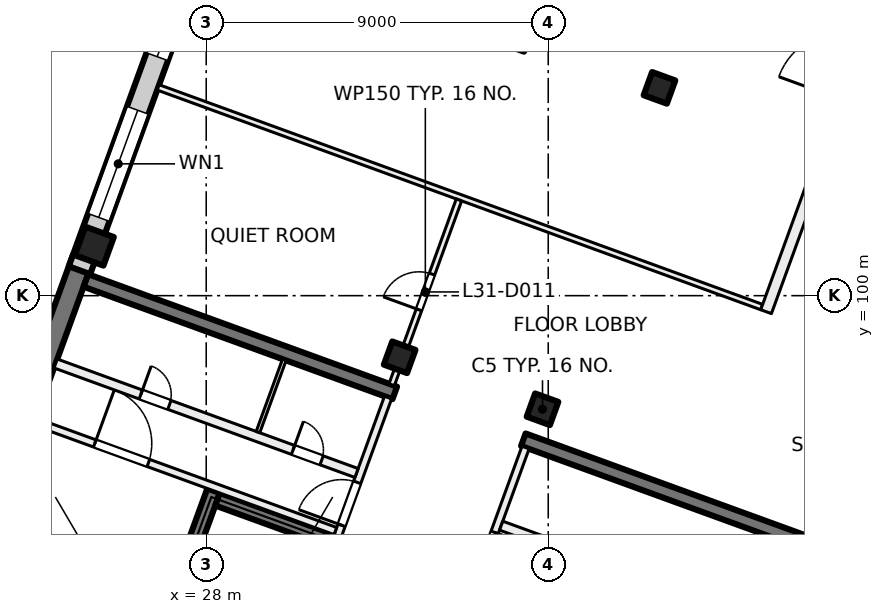
"""IFC4 building model, lengths in metres.
Left out: names, types, materials, properties, quantities, classifications, styles, units other than length and angle.
Written with IfcOpenShell. Run it as: python <this file> out.ifc"""

import sys

from ifc_helpers import new_model, si_unit, direction, frame, frame_2d, origin, origin_2d, place, context, subcontext, project, spatial, rectangle, extrude, element, fill, save


model = new_model("IFC4")
c1 = context("Model", 3, precision=1e-05, world=origin(), true_north=direction((0.0, 1.0)))
c2 = subcontext(c1, "Body", "Model", "MODEL_VIEW")
j1 = project(units=[si_unit("LENGTHUNIT", "METRE"), si_unit("PLANEANGLEUNIT", "RADIAN")], contexts=[c1])
p1 = place(None, origin())
s1 = spatial("IfcSite", under=j1, at=p1, CompositionType="ELEMENT")
p2 = place(p1, origin())
s2 = spatial("IfcBuilding", under=s1, at=p2, CompositionType="ELEMENT")
p3 = place(p2, frame((0.0, 0.0, 134.5)))
s3 = spatial("IfcBuildingStorey", under=s2, at=p3, CompositionType="ELEMENT", Elevation=134.5)
for number, where, z_axis, x_axis in (
    (1, (39.927, 105.468, 0.0), (0.0, 0.0, 1.0), (-0.342, -0.94, 0.0)),
    (2, (36.849, 97.011, 0.0), (0.0, 0.0, 1.0), (-0.342, -0.94, 0.0)),
    (3, (33.091, 98.379, 0.0), (0.0, 0.0, 1.0), (-0.342, -0.94, 0.0)),
):
    element("IfcColumn", number, at=place(p3, frame(where, z_axis=z_axis, x_axis=x_axis)), inside=s3, PredefinedType="COLUMN", context=c2, shape_type="SweptSolid", body=[
        extrude(rectangle(XDim=0.65, YDim=0.65, at=origin_2d()), origin(), (0.0, 0.0, 1.0), 4.0),
    ])
p4 = place(p3, frame((25.056, 101.303, 0.0), z_axis=(0.0, 0.0, 1.0), x_axis=(-0.342020143326, -0.939692620786, 0.0)))
e4 = element("IfcColumn", 4, at=p4, inside=s3, PredefinedType="COLUMN", context=c2, shape_type="SweptSolid", body=[
    extrude(rectangle(XDim=0.8, YDim=0.8, at=origin_2d()), origin(), (0.0, 0.0, 1.0), 4.0),
])
p5 = place(p3, frame((41.85, 85.241, 0.0), z_axis=(0.0, 0.0, 1.0), x_axis=(0.34201902012, 0.939693029598, 0.0)))
e5 = element("IfcWall", 5, at=p5, inside=s3, PredefinedType="SHEAR", context=c2, shape_type="SweptSolid", body=[
    extrude(rectangle(XDim=8.95, YDim=0.55, at=frame_2d((4.475, 0.0))), origin(), (0.0, 0.0, 1.0), 4.0),
])
p6 = place(p3, frame((21.694, 92.577, 0.0), z_axis=(0.0, 0.0, 1.0), x_axis=(0.342010253184, 0.939696220444, 0.0)))
e6 = element("IfcWall", 6, at=p6, inside=s3, PredefinedType="SHEAR", context=c2, shape_type="SweptSolid", body=[
    extrude(rectangle(XDim=8.95, YDim=0.55, at=frame_2d((4.475, 0.0))), origin(), (0.0, 0.0, 1.0), 4.0),
])
p7 = place(p3, frame((27.208, 82.216, 0.0), z_axis=(0.0, 0.0, 1.0), x_axis=(0.34201563943, 0.939694260058, 0.0)))
e7 = element("IfcWall", 7, at=p7, inside=s3, PredefinedType="SHEAR", context=c2, shape_type="SweptSolid", body=[
    extrude(rectangle(XDim=12.225, YDim=0.35, at=frame_2d((6.113, 0.0))), origin(), (0.0, 0.0, 1.0), 4.0),
])
p8 = place(p7, frame((0.7, 0.0, 0.0)))
e8 = element("IfcOpeningElement", 8, at=p8, cuts=e7, PredefinedType="OPENING", context=c2, shape_type="SweptSolid", body=[
    extrude(rectangle(XDim=1.1, YDim=2.1, at=frame_2d((0.55, 1.05))), frame((0.0, 0.185, 0.0), z_axis=(0.0, -1.0, 0.0), x_axis=(1.0, 0.0, 0.0)), (0.0, 0.0, 1.0), 0.37),
])
p9 = place(p7, frame((3.1, 0.0, 0.0)))
e9 = element("IfcOpeningElement", 9, at=p9, cuts=e7, PredefinedType="OPENING", context=c2, shape_type="SweptSolid", body=[
    extrude(rectangle(XDim=1.1, YDim=2.1, at=frame_2d((0.55, 1.05))), frame((0.0, 0.185, 0.0), z_axis=(0.0, -1.0, 0.0), x_axis=(1.0, 0.0, 0.0)), (0.0, 0.0, 1.0), 0.37),
])
p10 = place(p7, frame((5.5, 0.0, 0.0)))
e10 = element("IfcOpeningElement", 10, at=p10, cuts=e7, PredefinedType="OPENING", context=c2, shape_type="SweptSolid", body=[
    extrude(rectangle(XDim=1.1, YDim=2.1, at=frame_2d((0.55, 1.05))), frame((0.0, 0.185, 0.0), z_axis=(0.0, -1.0, 0.0), x_axis=(1.0, 0.0, 0.0)), (0.0, 0.0, 1.0), 0.37),
])
p11 = place(p7, frame((10.3, 0.0, 0.0)))
e11 = element("IfcOpeningElement", 11, at=p11, cuts=e7, PredefinedType="OPENING", context=c2, shape_type="SweptSolid", body=[
    extrude(rectangle(XDim=1.1, YDim=2.1, at=frame_2d((0.55, 1.05))), frame((0.0, 0.185, 0.0), z_axis=(0.0, -1.0, 0.0), x_axis=(1.0, 0.0, 0.0)), (0.0, 0.0, 1.0), 0.37),
])
p12 = place(p3, frame((24.013, 83.379, 0.0), z_axis=(0.0, 0.0, 1.0), x_axis=(0.34201563943, 0.939694260058, 0.0)))
e12 = element("IfcWall", 12, at=p12, inside=s3, PredefinedType="SHEAR", context=c2, shape_type="SweptSolid", body=[
    extrude(rectangle(XDim=12.225, YDim=0.35, at=frame_2d((6.113, 0.0))), origin(), (0.0, 0.0, 1.0), 4.0),
])
p13 = place(p12, frame((7.95, 0.0, 0.0)))
e13 = element("IfcOpeningElement", 13, at=p13, cuts=e12, PredefinedType="OPENING", context=c2, shape_type="SweptSolid", body=[
    extrude(rectangle(XDim=1.1, YDim=2.1, at=frame_2d((0.55, 1.05))), frame((0.0, 0.185, 0.0), z_axis=(0.0, -1.0, 0.0), x_axis=(1.0, 0.0, 0.0)), (0.0, 0.0, 1.0), 0.37),
])
p14 = place(p3, frame((31.165, 93.599, 0.0), z_axis=(0.0, 0.0, 1.0), x_axis=(-0.939683528043, 0.3420451244, 0.0)))
e14 = element("IfcWall", 14, at=p14, inside=s3, PredefinedType="SHEAR", context=c2, shape_type="SweptSolid", body=[
    extrude(rectangle(XDim=3.05, YDim=0.35, at=frame_2d((1.525, 0.0))), origin(), (0.0, 0.0, 1.0), 4.0),
])
p15 = place(p3, frame((44.473, 93.251, 0.0), z_axis=(0.0, 0.0, 1.0), x_axis=(-0.939692847377, 0.34201952077, 0.0)))
e15 = element("IfcWall", 15, at=p15, inside=s3, PredefinedType="SHEAR", context=c2, shape_type="SweptSolid", body=[
    extrude(rectangle(XDim=8.65, YDim=0.35, at=frame_2d((4.325, 0.0))), origin(), (0.0, 0.0, 1.0), 4.0),
])
p16 = place(p3, frame((32.962, 97.441, 0.0), z_axis=(0.0, 0.0, 1.0), x_axis=(-0.939689545667, 0.342028592028, 0.0)))
e16 = element("IfcWall", 16, at=p16, inside=s3, PredefinedType="SHEAR", context=c2, shape_type="SweptSolid", body=[
    extrude(rectangle(XDim=8.65, YDim=0.35, at=frame_2d((4.325, 0.0))), origin(), (0.0, 0.0, 1.0), 4.0),
])
p17 = place(p3, frame((24.666, 100.669, 0.0), z_axis=(0.0, 0.0, 1.0), x_axis=(0.34201964167, 0.939692803373, 0.0)))
e17 = element("IfcWall", 17, at=p17, inside=s3, PredefinedType="SOLIDWALL", context=c2, shape_type="SweptSolid", body=[
    extrude(rectangle(XDim=32.884, YDim=0.6, at=frame_2d((16.442, 0.0))), origin(), (0.0, 0.0, 1.0), 3.625),
])
p18 = place(p17, frame((1.48, 0.0, 0.9)))
e18 = element("IfcOpeningElement", 18, at=p18, cuts=e17, PredefinedType="OPENING", context=c2, shape_type="SweptSolid", body=[
    extrude(rectangle(XDim=3.0, YDim=2.4, at=frame_2d((1.5, 1.2))), frame((0.0, 0.31, 0.0), z_axis=(0.0, -1.0, 0.0), x_axis=(1.0, 0.0, 0.0)), (0.0, 0.0, 1.0), 0.62),
])
p19 = place(p17, frame((5.98, 0.0, 0.9)))
e19 = element("IfcOpeningElement", 19, at=p19, cuts=e17, PredefinedType="OPENING", context=c2, shape_type="SweptSolid", body=[
    extrude(rectangle(XDim=3.0, YDim=2.4, at=frame_2d((1.5, 1.2))), frame((0.0, 0.31, 0.0), z_axis=(0.0, -1.0, 0.0), x_axis=(1.0, 0.0, 0.0)), (0.0, 0.0, 1.0), 0.62),
])
p20 = place(p17, frame((10.48, 0.0, 0.9)))
e20 = element("IfcOpeningElement", 20, at=p20, cuts=e17, PredefinedType="OPENING", context=c2, shape_type="SweptSolid", body=[
    extrude(rectangle(XDim=3.0, YDim=2.4, at=frame_2d((1.5, 1.2))), frame((0.0, 0.31, 0.0), z_axis=(0.0, -1.0, 0.0), x_axis=(1.0, 0.0, 0.0)), (0.0, 0.0, 1.0), 0.62),
])
p21 = place(p17, frame((14.98, 0.0, 0.9)))
e21 = element("IfcOpeningElement", 21, at=p21, cuts=e17, PredefinedType="OPENING", context=c2, shape_type="SweptSolid", body=[
    extrude(rectangle(XDim=3.0, YDim=2.4, at=frame_2d((1.5, 1.2))), frame((0.0, 0.31, 0.0), z_axis=(0.0, -1.0, 0.0), x_axis=(1.0, 0.0, 0.0)), (0.0, 0.0, 1.0), 0.62),
])
p22 = place(p17, frame((19.48, 0.0, 0.9)))
e22 = element("IfcOpeningElement", 22, at=p22, cuts=e17, PredefinedType="OPENING", context=c2, shape_type="SweptSolid", body=[
    extrude(rectangle(XDim=3.0, YDim=2.4, at=frame_2d((1.5, 1.2))), frame((0.0, 0.31, 0.0), z_axis=(0.0, -1.0, 0.0), x_axis=(1.0, 0.0, 0.0)), (0.0, 0.0, 1.0), 0.62),
])
p23 = place(p17, frame((23.98, 0.0, 0.9)))
e23 = element("IfcOpeningElement", 23, at=p23, cuts=e17, PredefinedType="OPENING", context=c2, shape_type="SweptSolid", body=[
    extrude(rectangle(XDim=3.0, YDim=2.4, at=frame_2d((1.5, 1.2))), frame((0.0, 0.31, 0.0), z_axis=(0.0, -1.0, 0.0), x_axis=(1.0, 0.0, 0.0)), (0.0, 0.0, 1.0), 0.62),
])
p24 = place(p17, frame((28.48, 0.0, 0.9)))
e24 = element("IfcOpeningElement", 24, at=p24, cuts=e17, PredefinedType="OPENING", context=c2, shape_type="SweptSolid", body=[
    extrude(rectangle(XDim=3.0, YDim=2.4, at=frame_2d((1.5, 1.2))), frame((0.0, 0.31, 0.0), z_axis=(0.0, -1.0, 0.0), x_axis=(1.0, 0.0, 0.0)), (0.0, 0.0, 1.0), 0.62),
])
p25 = place(p3, frame((31.459, 93.678, 0.0), z_axis=(0.0, 0.0, 1.0), x_axis=(0.341985870128, 0.939705094502, 0.0)))
e25 = element("IfcWall", 25, at=p25, inside=s3, PredefinedType="PARTITIONING", context=c2, shape_type="SweptSolid", body=[
    extrude(rectangle(XDim=3.875, YDim=0.2, at=frame_2d((1.938, 0.0))), origin(), (0.0, 0.0, 1.0), 3.625),
])
p26 = place(p25, frame((0.3, 0.0, 0.0)))
e26 = element("IfcOpeningElement", 26, at=p26, cuts=e25, PredefinedType="OPENING", context=c2, shape_type="SweptSolid", body=[
    extrude(rectangle(XDim=1.2, YDim=2.1, at=frame_2d((0.6, 1.05))), frame((0.0, 0.11, 0.0), z_axis=(0.0, -1.0, 0.0), x_axis=(1.0, 0.0, 0.0)), (0.0, 0.0, 1.0), 0.22),
])
p27 = place(p3, frame((23.483, 96.688, 0.0), z_axis=(0.0, 0.0, 1.0), x_axis=(0.939691007314, -0.342024576271, 0.0)))
e27 = element("IfcWall", 27, at=p27, inside=s3, PredefinedType="PARTITIONING", context=c2, shape_type="SweptSolid", body=[
    extrude(rectangle(XDim=8.425, YDim=0.2, at=frame_2d((4.212, 0.0))), origin(), (0.0, 0.0, 1.0), 3.625),
])
p28 = place(p27, frame((1.688, 0.0, 0.0)))
e28 = element("IfcOpeningElement", 28, at=p28, cuts=e27, PredefinedType="OPENING", context=c2, shape_type="SweptSolid", body=[
    extrude(rectangle(XDim=1.5, YDim=2.1, at=frame_2d((0.75, 1.05))), frame((0.0, 0.11, 0.0), z_axis=(0.0, -1.0, 0.0), x_axis=(1.0, 0.0, 0.0)), (0.0, 0.0, 1.0), 0.22),
])
p29 = place(p3, frame((24.039, 98.215, 0.0), z_axis=(0.0, 0.0, 1.0), x_axis=(0.939687617333, -0.342033889887, 0.0)))
e29 = element("IfcWall", 29, at=p29, inside=s3, PredefinedType="PARTITIONING", context=c2, shape_type="SweptSolid", body=[
    extrude(rectangle(XDim=8.425, YDim=0.25, at=frame_2d((4.212, 0.0))), origin(), (0.0, 0.0, 1.0), 3.625),
])
p30 = place(p29, frame((6.647, 0.0, 0.0)))
e30 = element("IfcOpeningElement", 30, at=p30, cuts=e29, PredefinedType="OPENING", context=c2, shape_type="SweptSolid", body=[
    extrude(rectangle(XDim=0.8, YDim=2.1, at=frame_2d((0.4, 1.05))), frame((0.0, 0.135, 0.0), z_axis=(0.0, -1.0, 0.0), x_axis=(1.0, 0.0, 0.0)), (0.0, 0.0, 1.0), 0.27),
])
p31 = place(p29, frame((2.385, 0.0, 0.0)))
e31 = element("IfcOpeningElement", 31, at=p31, cuts=e29, PredefinedType="OPENING", context=c2, shape_type="SweptSolid", body=[
    extrude(rectangle(XDim=0.8, YDim=2.1, at=frame_2d((0.4, 1.05))), frame((0.0, 0.135, 0.0), z_axis=(0.0, -1.0, 0.0), x_axis=(1.0, 0.0, 0.0)), (0.0, 0.0, 1.0), 0.27),
])
p32 = place(p3, frame((29.362, 96.41, 0.0), z_axis=(0.0, 0.0, 1.0), x_axis=(0.342043138314, 0.939684250976, 0.0)))
e32 = element("IfcWall", 32, at=p32, inside=s3, PredefinedType="PARTITIONING", context=c2, shape_type="SweptSolid", body=[
    extrude(rectangle(XDim=2.025, YDim=0.1, at=frame_2d((1.012, 0.0))), origin(), (0.0, 0.0, 1.0), 3.625),
])
p33 = place(p3, frame((36.403, 96.003, 0.0), z_axis=(0.0, 0.0, 1.0), x_axis=(-0.342041503764, -0.939684845947, 0.0)))
e33 = element("IfcWall", 33, at=p33, inside=s3, PredefinedType="PARTITIONING", context=c2, shape_type="SweptSolid", body=[
    extrude(rectangle(XDim=3.875, YDim=0.2, at=frame_2d((1.938, 0.0))), origin(), (0.0, 0.0, 1.0), 3.625),
])
p34 = place(p33, frame((2.375, 0.0, 0.0)))
e34 = element("IfcOpeningElement", 34, at=p34, cuts=e33, PredefinedType="OPENING", context=c2, shape_type="SweptSolid", body=[
    extrude(rectangle(XDim=1.2, YDim=2.1, at=frame_2d((0.6, 1.05))), frame((0.0, 0.11, 0.0), z_axis=(0.0, -1.0, 0.0), x_axis=(1.0, 0.0, 0.0)), (0.0, 0.0, 1.0), 0.22),
])
p35 = place(p3, frame((35.761, 93.948, 0.0), z_axis=(0.0, 0.0, 1.0), x_axis=(0.93969693093, -0.342008301071, 0.0)))
e35 = element("IfcWall", 35, at=p35, inside=s3, PredefinedType="PARTITIONING", context=c2, shape_type="SweptSolid", body=[
    extrude(rectangle(XDim=8.425, YDim=0.25, at=frame_2d((4.212, 0.0))), origin(), (0.0, 0.0, 1.0), 3.625),
])
p36 = place(p35, frame((3.812, 0.0, 0.0)))
e36 = element("IfcOpeningElement", 36, at=p36, cuts=e35, PredefinedType="OPENING", context=c2, shape_type="SweptSolid", body=[
    extrude(rectangle(XDim=0.8, YDim=2.1, at=frame_2d((0.4, 1.05))), frame((0.0, 0.135, 0.0), z_axis=(0.0, -1.0, 0.0), x_axis=(1.0, 0.0, 0.0)), (0.0, 0.0, 1.0), 0.27),
])
p37 = place(p3, frame((26.736, 105.48, 0.0), z_axis=(0.0, 0.0, 1.0), x_axis=(0.939695108427, -0.342013308511, 0.0)))
e37 = element("IfcWall", 37, at=p37, inside=s3, PredefinedType="PARTITIONING", context=c2, shape_type="SweptSolid", body=[
    extrude(rectangle(XDim=16.9, YDim=0.15, at=frame_2d((8.45, 0.0))), origin(), (0.0, 0.0, 1.0), 3.625),
])
p38 = place(p3, frame((32.881, 97.657, 0.0), z_axis=(0.0, 0.0, 1.0), x_axis=(0.341981688871, 0.939706616172, 0.0)))
e38 = element("IfcWall", 38, at=p38, inside=s3, PredefinedType="PARTITIONING", context=c2, shape_type="SweptSolid", body=[
    extrude(rectangle(XDim=5.175, YDim=0.15, at=frame_2d((2.587, 0.0))), origin(), (0.0, 0.0, 1.0), 3.625),
])
p39 = place(p38, frame((2.098, 0.0, 0.0)))
e39 = element("IfcOpeningElement", 39, at=p39, cuts=e38, PredefinedType="OPENING", context=c2, shape_type="SweptSolid", body=[
    extrude(rectangle(XDim=1.0, YDim=2.1, at=frame_2d((0.5, 1.05))), frame((0.0, 0.085, 0.0), z_axis=(0.0, -1.0, 0.0), x_axis=(1.0, 0.0, 0.0)), (0.0, 0.0, 1.0), 0.17),
])
p40 = place(p3, frame((42.732, 99.579, 0.0), z_axis=(0.0, 0.0, 1.0), x_axis=(0.342036000593, 0.939686849061, 0.0)))
e40 = element("IfcWall", 40, at=p40, inside=s3, PredefinedType="PARTITIONING", context=c2, shape_type="SweptSolid", body=[
    extrude(rectangle(XDim=23.018, YDim=0.3, at=frame_2d((11.509, 0.0))), origin(), (0.0, 0.0, 1.0), 3.625),
])
p41 = place(p40, frame((15.225, 0.0, 0.0)))
e41 = element("IfcOpeningElement", 41, at=p41, cuts=e40, PredefinedType="OPENING", context=c2, shape_type="SweptSolid", body=[
    extrude(rectangle(XDim=1.2, YDim=2.1, at=frame_2d((0.6, 1.05))), frame((0.0, 0.16, 0.0), z_axis=(0.0, -1.0, 0.0), x_axis=(1.0, 0.0, 0.0)), (0.0, 0.0, 1.0), 0.32),
])
p42 = place(p40, frame((19.725, 0.0, 0.0)))
e42 = element("IfcOpeningElement", 42, at=p42, cuts=e40, PredefinedType="OPENING", context=c2, shape_type="SweptSolid", body=[
    extrude(rectangle(XDim=1.2, YDim=2.1, at=frame_2d((0.6, 1.05))), frame((0.0, 0.16, 0.0), z_axis=(0.0, -1.0, 0.0), x_axis=(1.0, 0.0, 0.0)), (0.0, 0.0, 1.0), 0.32),
])
p43 = place(p40, frame((5.925, 0.0, 0.0)))
e43 = element("IfcOpeningElement", 43, at=p43, cuts=e40, PredefinedType="OPENING", context=c2, shape_type="SweptSolid", body=[
    extrude(rectangle(XDim=1.8, YDim=2.1, at=frame_2d((0.9, 1.05))), frame((0.0, 0.16, 0.0), z_axis=(0.0, -1.0, 0.0), x_axis=(1.0, 0.0, 0.0)), (0.0, 0.0, 1.0), 0.32),
])
p44 = place(p18, origin())
e44 = element("IfcWindow", 44, at=p44, inside=s3, PartitioningType="SINGLE_PANEL", PredefinedType="WINDOW", context=c2, shape_type="SweptSolid", body=[
    extrude(rectangle(XDim=3.0, YDim=2.4, at=frame_2d((1.5, 1.2))), frame((0.0, 0.03, 0.0), z_axis=(0.0, -1.0, 0.0), x_axis=(1.0, 0.0, 0.0)), (0.0, 0.0, 1.0), 0.06),
])
fill(e18, e44)
p45 = place(p19, origin())
e45 = element("IfcWindow", 45, at=p45, inside=s3, PartitioningType="SINGLE_PANEL", PredefinedType="WINDOW", context=c2, shape_type="SweptSolid", body=[
    extrude(rectangle(XDim=3.0, YDim=2.4, at=frame_2d((1.5, 1.2))), frame((0.0, 0.03, 0.0), z_axis=(0.0, -1.0, 0.0), x_axis=(1.0, 0.0, 0.0)), (0.0, 0.0, 1.0), 0.06),
])
fill(e19, e45)
p46 = place(p26, origin())
e46 = element("IfcDoor", 46, at=p46, inside=s3, OperationType="DOUBLE_DOOR_SINGLE_SWING", PredefinedType="DOOR", context=c2, shape_type="SweptSolid", body=[
    extrude(rectangle(XDim=1.2, YDim=2.1, at=frame_2d((0.6, 1.05))), frame((0.0, 0.025, 0.0), z_axis=(0.0, -1.0, 0.0), x_axis=(1.0, 0.0, 0.0)), (0.0, 0.0, 1.0), 0.05),
])
fill(e26, e46)
p47 = place(p28, origin())
e47 = element("IfcDoor", 47, at=p47, inside=s3, OperationType="DOUBLE_DOOR_SINGLE_SWING", PredefinedType="DOOR", context=c2, shape_type="SweptSolid", body=[
    extrude(rectangle(XDim=1.5, YDim=2.1, at=frame_2d((0.75, 1.05))), frame((0.0, 0.025, 0.0), z_axis=(0.0, -1.0, 0.0), x_axis=(1.0, 0.0, 0.0)), (0.0, 0.0, 1.0), 0.05),
])
fill(e28, e47)
p48 = place(p30, origin())
e48 = element("IfcDoor", 48, at=p48, inside=s3, OperationType="SINGLE_SWING_LEFT", PredefinedType="DOOR", context=c2, shape_type="SweptSolid", body=[
    extrude(rectangle(XDim=0.8, YDim=2.1, at=frame_2d((0.4, 1.05))), frame((0.0, 0.025, 0.0), z_axis=(0.0, -1.0, 0.0), x_axis=(1.0, 0.0, 0.0)), (0.0, 0.0, 1.0), 0.05),
])
fill(e30, e48)
p49 = place(p31, origin())
e49 = element("IfcDoor", 49, at=p49, inside=s3, OperationType="SINGLE_SWING_RIGHT", PredefinedType="DOOR", context=c2, shape_type="SweptSolid", body=[
    extrude(rectangle(XDim=0.8, YDim=2.1, at=frame_2d((0.4, 1.05))), frame((0.0, 0.025, 0.0), z_axis=(0.0, -1.0, 0.0), x_axis=(1.0, 0.0, 0.0)), (0.0, 0.0, 1.0), 0.05),
])
fill(e31, e49)
p50 = place(p34, origin())
e50 = element("IfcDoor", 50, at=p50, inside=s3, OperationType="DOUBLE_DOOR_SINGLE_SWING", PredefinedType="DOOR", context=c2, shape_type="SweptSolid", body=[
    extrude(rectangle(XDim=1.2, YDim=2.1, at=frame_2d((0.6, 1.05))), frame((0.0, 0.025, 0.0), z_axis=(0.0, -1.0, 0.0), x_axis=(1.0, 0.0, 0.0)), (0.0, 0.0, 1.0), 0.05),
])
fill(e34, e50)
p51 = place(p39, origin())
e51 = element("IfcDoor", 51, at=p51, inside=s3, OperationType="SINGLE_SWING_LEFT", PredefinedType="DOOR", context=c2, shape_type="SweptSolid", body=[
    extrude(rectangle(XDim=1.0, YDim=2.1, at=frame_2d((0.5, 1.05))), frame((0.0, 0.025, 0.0), z_axis=(0.0, -1.0, 0.0), x_axis=(1.0, 0.0, 0.0)), (0.0, 0.0, 1.0), 0.05),
])
fill(e39, e51)
save(model, sys.argv[1])
